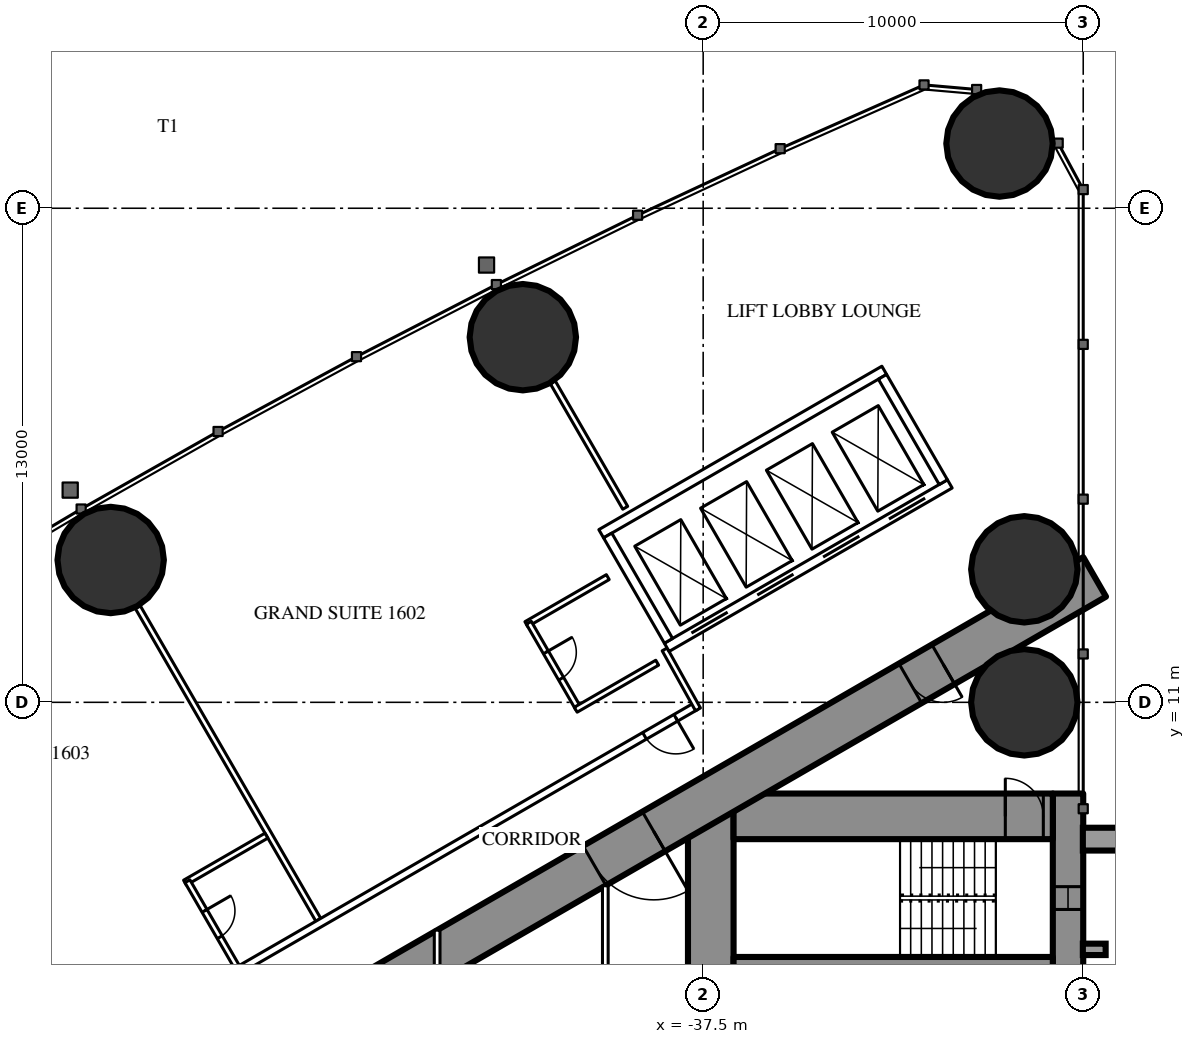
"""IFC4 building model, lengths in metres.
Left out: names, types, materials, properties, quantities, classifications, styles, units other than length and angle.
Written with IfcOpenShell. Run it as: python <this file> out.ifc"""

import sys

from ifc_helpers import new_model, si_unit, direction, frame, frame_2d, origin, origin_2d, place, context, subcontext, project, spatial, rectangle, hollow_circle, extrude, element, fill, save


model = new_model("IFC4")
c1 = context("Model", 3, precision=1e-05, world=origin(), true_north=direction((0.0, 1.0)))
c2 = subcontext(c1, "Body", "Model", "MODEL_VIEW")
j1 = project(units=[si_unit("LENGTHUNIT", "METRE"), si_unit("PLANEANGLEUNIT", "RADIAN")], contexts=[c1])
p1 = place(None, origin())
s1 = spatial("IfcSite", under=j1, at=p1, CompositionType="ELEMENT")
p2 = place(p1, origin())
s2 = spatial("IfcBuilding", under=s1, at=p2, CompositionType="ELEMENT")
p3 = place(p2, frame((0.0, 0.0, 63.5)))
s3 = spatial("IfcBuildingStorey", under=s2, at=p3, CompositionType="ELEMENT", Elevation=63.5)
for number, where, z_axis, x_axis in (
    (1, (-29.703, 25.703, 0.0), (0.0, 0.0, 1.0), (1.0, 0.0, 0.0)),
    (2, (-29.05, 11.0, 0.0), (0.0, 0.0, 1.0), (1.0, 0.0, 0.0)),
    (3, (-29.05, 14.5, 0.0), (0.0, 0.0, 1.0), (1.0, 0.0, 0.0)),
    (4, (-42.245, 20.607, 0.0), (0.0, 0.0, 1.0), (1.0, 0.0, 0.0)),
    (5, (-53.09, 14.745, 0.0), (0.0, 0.0, 1.0), (1.0, 0.0, 0.0)),
):
    element("IfcColumn", number, at=place(p3, frame(where, z_axis=z_axis, x_axis=x_axis)), inside=s3, PredefinedType="COLUMN", context=c2, shape_type="SweptSolid", body=[
        extrude(hollow_circle(Radius=1.4, WallThickness=0.12, at=origin_2d()), origin(), (0.0, 0.0, 1.0), 3.5),
    ])
p4 = place(p3, frame((-27.9, 8.6, 0.0), z_axis=(0.0, 0.0, 1.0), x_axis=(0.0, -1.0, 0.0)))
e6 = element("IfcWall", 6, at=p4, inside=s3, PredefinedType="SHEAR", context=c2, shape_type="SweptSolid", body=[
    extrude(rectangle(XDim=17.2, YDim=0.8, at=frame_2d((8.6, 0.0))), origin(), (0.0, 0.0, 1.0), 3.5),
])
p5 = place(p4, frame((2.45, 0.0, 0.6)))
e7 = element("IfcOpeningElement", 7, at=p5, cuts=e6, PredefinedType="OPENING", context=c2, shape_type="SweptSolid", body=[
    extrude(rectangle(XDim=0.6, YDim=2.1, at=frame_2d((0.3, 1.05))), frame((0.0, 0.41, 0.0), z_axis=(0.0, -1.0, 0.0), x_axis=(1.0, 0.0, 0.0)), (0.0, 0.0, 1.0), 0.82),
])
p6 = place(p4, frame((14.15, 0.0, 0.6)))
e8 = element("IfcOpeningElement", 8, at=p6, cuts=e6, PredefinedType="OPENING", context=c2, shape_type="SweptSolid", body=[
    extrude(rectangle(XDim=0.6, YDim=2.1, at=frame_2d((0.3, 1.05))), frame((0.0, 0.41, 0.0), z_axis=(0.0, -1.0, 0.0), x_axis=(1.0, 0.0, 0.0)), (0.0, 0.0, 1.0), 0.82),
])
p7 = place(p3, frame((-37.3, 8.6, 0.0), z_axis=(0.0, 0.0, 1.0), x_axis=(0.0, -1.0, 0.0)))
e9 = element("IfcWall", 9, at=p7, inside=s3, PredefinedType="SHEAR", context=c2, shape_type="SweptSolid", body=[
    extrude(rectangle(XDim=17.2, YDim=1.2, at=frame_2d((8.6, 0.0))), origin(), (0.0, 0.0, 1.0), 3.5),
])
p8 = place(p7, frame((7.7, 0.0, 0.0)))
e10 = element("IfcOpeningElement", 10, at=p8, cuts=e9, PredefinedType="OPENING", context=c2, shape_type="SweptSolid", body=[
    extrude(rectangle(XDim=1.8, YDim=2.2, at=frame_2d((0.9, 1.1))), frame((0.0, 0.61, 0.0), z_axis=(0.0, -1.0, 0.0), x_axis=(1.0, 0.0, 0.0)), (0.0, 0.0, 1.0), 1.22),
])
p9 = place(p3, frame((-28.3, 8.0, 0.0), z_axis=(0.0, 0.0, 1.0), x_axis=(-1.0, 0.0, 0.0)))
e11 = element("IfcWall", 11, at=p9, inside=s3, PredefinedType="SHEAR", context=c2, shape_type="SweptSolid", body=[
    extrude(rectangle(XDim=8.4, YDim=1.2, at=frame_2d((4.2, 0.0))), origin(), (0.0, 0.0, 1.0), 3.5),
])
p10 = place(p9, frame((0.25, 0.0, 0.0)))
e12 = element("IfcOpeningElement", 12, at=p10, cuts=e11, PredefinedType="OPENING", context=c2, shape_type="SweptSolid", body=[
    extrude(rectangle(XDim=1.0, YDim=2.2, at=frame_2d((0.5, 1.1))), frame((0.0, 0.61, 0.0), z_axis=(0.0, -1.0, 0.0), x_axis=(1.0, 0.0, 0.0)), (0.0, 0.0, 1.0), 1.22),
])
p11 = place(p3, frame((-28.3, 4.15, 0.0), z_axis=(0.0, 0.0, 1.0), x_axis=(-1.0, 0.0, 0.0)))
e13 = element("IfcWall", 13, at=p11, inside=s3, PredefinedType="SHEAR", context=c2, shape_type="SweptSolid", body=[
    extrude(rectangle(XDim=8.4, YDim=0.3, at=frame_2d((4.2, 0.0))), origin(), (0.0, 0.0, 1.0), 3.5),
])
p12 = place(p3, frame((-27.2, 14.3, 0.0), z_axis=(0.0, 0.0, 1.0), x_axis=(-0.866026593062, -0.499997940104, 0.0)))
e14 = element("IfcWall", 14, at=p12, inside=s3, PredefinedType="SHEAR", context=c2, shape_type="SweptSolid", body=[
    extrude(rectangle(XDim=28.946, YDim=1.2, at=frame_2d((14.473, 0.0))), origin(), (0.0, 0.0, 1.0), 3.5),
])
p13 = place(p12, frame((4.6, 0.0, 0.0)))
e15 = element("IfcOpeningElement", 15, at=p13, cuts=e14, PredefinedType="OPENING", context=c2, shape_type="SweptSolid", body=[
    extrude(rectangle(XDim=1.0, YDim=2.2, at=frame_2d((0.5, 1.1))), frame((0.0, 0.61, 0.0), z_axis=(0.0, -1.0, 0.0), x_axis=(1.0, 0.0, 0.0)), (0.0, 0.0, 1.0), 1.22),
])
p14 = place(p12, frame((13.395, 0.0, 0.0)))
e16 = element("IfcOpeningElement", 16, at=p14, cuts=e14, PredefinedType="OPENING", context=c2, shape_type="SweptSolid", body=[
    extrude(rectangle(XDim=1.8, YDim=2.2, at=frame_2d((0.9, 1.1))), frame((0.0, 0.61, 0.0), z_axis=(0.0, -1.0, 0.0), x_axis=(1.0, 0.0, 0.0)), (0.0, 0.0, 1.0), 1.22),
])
p15 = place(p3, frame((-47.627, 5.278, 0.0), z_axis=(0.0, 0.0, 1.0), x_axis=(-0.500009844318, 0.86601972009, 0.0)))
e17 = element("IfcWall", 17, at=p15, inside=s3, PredefinedType="PARTITIONING", context=c2, shape_type="SweptSolid", body=[
    extrude(rectangle(XDim=9.51, YDim=0.15, at=frame_2d((4.755, 0.0))), origin(), (0.0, 0.0, 1.0), 2.25),
])
p16 = place(p3, frame((-39.551, 16.119, 0.0), z_axis=(0.0, 0.0, 1.0), x_axis=(-0.500014214979, 0.866017196607, 0.0)))
e18 = element("IfcWall", 18, at=p16, inside=s3, PredefinedType="PARTITIONING", context=c2, shape_type="SweptSolid", body=[
    extrude(rectangle(XDim=3.815, YDim=0.15, at=frame_2d((1.907, 0.0))), origin(), (0.0, 0.0, 1.0), 3.25),
])
p17 = place(p3, frame((-37.7, 10.894, 0.0), z_axis=(0.0, 0.0, 1.0), x_axis=(-0.866027905338, -0.499995667157, 0.0)))
e19 = element("IfcWall", 19, at=p17, inside=s3, PredefinedType="PARTITIONING", context=c2, shape_type="SweptSolid", body=[
    extrude(rectangle(XDim=21.787, YDim=0.2, at=frame_2d((10.894, 0.0))), origin(), (0.0, 0.0, 1.0), 3.25),
])
p18 = place(p17, frame((14.13, 0.0, 0.0)))
e20 = element("IfcOpeningElement", 20, at=p18, cuts=e19, PredefinedType="OPENING", context=c2, shape_type="SweptSolid", body=[
    extrude(rectangle(XDim=0.95, YDim=2.2, at=frame_2d((0.475, 1.1))), frame((0.0, 0.11, 0.0), z_axis=(0.0, -1.0, 0.0), x_axis=(1.0, 0.0, 0.0)), (0.0, 0.0, 1.0), 0.22),
])
p19 = place(p17, frame((20.058, 0.0, 0.0)))
e21 = element("IfcOpeningElement", 21, at=p19, cuts=e19, PredefinedType="OPENING", context=c2, shape_type="SweptSolid", body=[
    extrude(rectangle(XDim=0.95, YDim=2.2, at=frame_2d((0.475, 1.1))), frame((0.0, 0.11, 0.0), z_axis=(0.0, -1.0, 0.0), x_axis=(1.0, 0.0, 0.0)), (0.0, 0.0, 1.0), 0.22),
])
p20 = place(p17, frame((0.6, 0.0, 0.0)))
e22 = element("IfcOpeningElement", 22, at=p20, cuts=e19, PredefinedType="OPENING", context=c2, shape_type="SweptSolid", body=[
    extrude(rectangle(XDim=0.95, YDim=2.2, at=frame_2d((0.475, 1.1))), frame((0.0, 0.11, 0.0), z_axis=(0.0, -1.0, 0.0), x_axis=(1.0, 0.0, 0.0)), (0.0, 0.0, 1.0), 0.22),
])
p21 = place(p3, frame((-38.513, 12.392, 0.0), z_axis=(0.0, 0.0, 1.0), x_axis=(0.485585508183, -0.874189175317, 0.0)))
e23 = element("IfcWall", 23, at=p21, inside=s3, PredefinedType="PARTITIONING", context=c2, shape_type="SweptSolid", body=[
    extrude(rectangle(XDim=1.805, YDim=0.15, at=frame_2d((0.902, 0.0))), origin(), (0.0, 0.0, 1.0), 3.25),
])
p22 = place(p3, frame((-48.992, 7.492, 0.0), z_axis=(0.0, 0.0, 1.0), x_axis=(-0.866031185235, -0.4999899861, 0.0)))
e24 = element("IfcWall", 24, at=p22, inside=s3, PredefinedType="PARTITIONING", context=c2, shape_type="SweptSolid", body=[
    extrude(rectangle(XDim=2.475, YDim=0.15, at=frame_2d((1.238, 0.0))), origin(), (0.0, 0.0, 1.0), 3.25),
])
p23 = place(p3, frame((-49.77, 4.04, 0.0), z_axis=(0.0, 0.0, 1.0), x_axis=(-0.500006934395, 0.866021400173, 0.0)))
e25 = element("IfcWall", 25, at=p23, inside=s3, PredefinedType="PARTITIONING", context=c2, shape_type="SweptSolid", body=[
    extrude(rectangle(XDim=2.6, YDim=0.15, at=frame_2d((1.3, 0.0))), origin(), (0.0, 0.0, 1.0), 3.25),
])
p24 = place(p23, frame((0.9, 0.0, 0.0)))
e26 = element("IfcOpeningElement", 26, at=p24, cuts=e25, PredefinedType="OPENING", context=c2, shape_type="SweptSolid", body=[
    extrude(rectangle(XDim=0.8, YDim=2.2, at=frame_2d((0.4, 1.1))), frame((0.0, 0.085, 0.0), z_axis=(0.0, -1.0, 0.0), x_axis=(1.0, 0.0, 0.0)), (0.0, 0.0, 1.0), 0.17),
])
p25 = place(p3, frame((-40.01, 14.294, 0.0), z_axis=(0.0, 0.0, 1.0), x_axis=(-0.866031185235, -0.4999899861, 0.0)))
e27 = element("IfcWall", 27, at=p25, inside=s3, PredefinedType="PARTITIONING", context=c2, shape_type="SweptSolid", body=[
    extrude(rectangle(XDim=2.475, YDim=0.15, at=frame_2d((1.238, 0.0))), origin(), (0.0, 0.0, 1.0), 3.25),
])
p26 = place(p3, frame((-40.788, 10.843, 0.0), z_axis=(0.0, 0.0, 1.0), x_axis=(-0.500006934395, 0.866021400173, 0.0)))
e28 = element("IfcWall", 28, at=p26, inside=s3, PredefinedType="PARTITIONING", context=c2, shape_type="SweptSolid", body=[
    extrude(rectangle(XDim=2.6, YDim=0.15, at=frame_2d((1.3, 0.0))), origin(), (0.0, 0.0, 1.0), 3.25),
])
p27 = place(p26, frame((0.9, 0.0, 0.0)))
e29 = element("IfcOpeningElement", 29, at=p27, cuts=e28, PredefinedType="OPENING", context=c2, shape_type="SweptSolid", body=[
    extrude(rectangle(XDim=0.8, YDim=2.2, at=frame_2d((0.4, 1.1))), frame((0.0, 0.085, 0.0), z_axis=(0.0, -1.0, 0.0), x_axis=(1.0, 0.0, 0.0)), (0.0, 0.0, 1.0), 0.17),
])
p28 = place(p3, frame((-38.71, 12.042, 0.0), z_axis=(0.0, 0.0, 1.0), x_axis=(-0.86604923931, -0.499958713387, 0.0)))
e30 = element("IfcWall", 30, at=p28, inside=s3, PredefinedType="PARTITIONING", context=c2, shape_type="SweptSolid", body=[
    extrude(rectangle(XDim=2.475, YDim=0.15, at=frame_2d((1.237, 0.0))), origin(), (0.0, 0.0, 1.0), 3.25),
])
p29 = place(p3, frame((-40.075, 6.174, 0.0), z_axis=(0.0, 0.0, 1.0), x_axis=(0.0, -1.0, 0.0)))
e31 = element("IfcWall", 31, at=p29, inside=s3, PredefinedType="PARTITIONING", context=c2, shape_type="SweptSolid", body=[
    extrude(rectangle(XDim=7.374, YDim=0.15, at=frame_2d((3.687, 0.0))), origin(), (0.0, 0.0, 1.0), 3.25),
])
p30 = place(p29, frame((2.787, 0.0, 0.0)))
e32 = element("IfcOpeningElement", 32, at=p30, cuts=e31, PredefinedType="OPENING", context=c2, shape_type="SweptSolid", body=[
    extrude(rectangle(XDim=1.8, YDim=2.2, at=frame_2d((0.9, 1.1))), frame((0.0, 0.085, 0.0), z_axis=(0.0, -1.0, 0.0), x_axis=(1.0, 0.0, 0.0)), (0.0, 0.0, 1.0), 0.17),
])
p31 = place(p3, frame((-44.5, 5.005, 0.0), z_axis=(0.0, 0.0, 1.0), x_axis=(0.0, -1.0, 0.0)))
e33 = element("IfcWall", 33, at=p31, inside=s3, PredefinedType="PARTITIONING", context=c2, shape_type="SweptSolid", body=[
    extrude(rectangle(XDim=10.009, YDim=0.15, at=frame_2d((5.005, 0.0))), origin(), (0.0, 0.0, 1.0), 2.45),
])
p32 = place(p31, frame((2.002, 0.0, 0.0)))
e34 = element("IfcOpeningElement", 34, at=p32, cuts=e33, PredefinedType="OPENING", context=c2, shape_type="SweptSolid", body=[
    extrude(rectangle(XDim=1.0, YDim=2.2, at=frame_2d((0.5, 1.1))), frame((0.0, 0.085, 0.0), z_axis=(0.0, -1.0, 0.0), x_axis=(1.0, 0.0, 0.0)), (0.0, 0.0, 1.0), 0.17),
])
p33 = place(p31, frame((7.007, 0.0, 0.0)))
e35 = element("IfcOpeningElement", 35, at=p33, cuts=e33, PredefinedType="OPENING", context=c2, shape_type="SweptSolid", body=[
    extrude(rectangle(XDim=1.0, YDim=2.2, at=frame_2d((0.5, 1.1))), frame((0.0, 0.085, 0.0), z_axis=(0.0, -1.0, 0.0), x_axis=(1.0, 0.0, 0.0)), (0.0, 0.0, 1.0), 0.17),
])
p34 = place(p3, frame((-31.01, 16.747, 0.0), z_axis=(0.0, 0.0, 1.0), x_axis=(-0.866028165386, -0.499995216735, 0.0)))
e36 = element("IfcWall", 36, at=p34, inside=s3, PredefinedType="PARTITIONING", context=c2, shape_type="SweptSolid", body=[
    extrude(rectangle(XDim=8.6, YDim=0.25, at=frame_2d((4.3, 0.0))), origin(), (0.0, 0.0, 1.0), 3.25),
])
p35 = place(p34, frame((0.75, 0.0, 0.0)))
e37 = element("IfcOpeningElement", 37, at=p35, cuts=e36, PredefinedType="OPENING", context=c2, shape_type="SweptSolid", body=[
    extrude(rectangle(XDim=1.1, YDim=2.2, at=frame_2d((0.55, 1.1))), frame((0.0, 0.135, 0.0), z_axis=(0.0, -1.0, 0.0), x_axis=(1.0, 0.0, 0.0)), (0.0, 0.0, 1.0), 0.27),
])
p36 = place(p34, frame((2.75, 0.0, 0.0)))
e38 = element("IfcOpeningElement", 38, at=p36, cuts=e36, PredefinedType="OPENING", context=c2, shape_type="SweptSolid", body=[
    extrude(rectangle(XDim=1.1, YDim=2.2, at=frame_2d((0.55, 1.1))), frame((0.0, 0.135, 0.0), z_axis=(0.0, -1.0, 0.0), x_axis=(1.0, 0.0, 0.0)), (0.0, 0.0, 1.0), 0.27),
])
p37 = place(p34, frame((4.75, 0.0, 0.0)))
e39 = element("IfcOpeningElement", 39, at=p37, cuts=e36, PredefinedType="OPENING", context=c2, shape_type="SweptSolid", body=[
    extrude(rectangle(XDim=1.1, YDim=2.2, at=frame_2d((0.55, 1.1))), frame((0.0, 0.135, 0.0), z_axis=(0.0, -1.0, 0.0), x_axis=(1.0, 0.0, 0.0)), (0.0, 0.0, 1.0), 0.27),
])
p38 = place(p34, frame((6.75, 0.0, 0.0)))
e40 = element("IfcOpeningElement", 40, at=p38, cuts=e36, PredefinedType="OPENING", context=c2, shape_type="SweptSolid", body=[
    extrude(rectangle(XDim=1.1, YDim=2.2, at=frame_2d((0.55, 1.1))), frame((0.0, 0.135, 0.0), z_axis=(0.0, -1.0, 0.0), x_axis=(1.0, 0.0, 0.0)), (0.0, 0.0, 1.0), 0.27),
])
p39 = place(p3, frame((-32.736, 19.736, 0.0), z_axis=(0.0, 0.0, 1.0), x_axis=(-0.866028165386, -0.499995216735, 0.0)))
e41 = element("IfcWall", 41, at=p39, inside=s3, PredefinedType="PARTITIONING", context=c2, shape_type="SweptSolid", body=[
    extrude(rectangle(XDim=8.6, YDim=0.25, at=frame_2d((4.3, 0.0))), origin(), (0.0, 0.0, 1.0), 3.25),
])
p40 = place(p3, frame((-31.181, 16.793, 0.0), z_axis=(0.0, 0.0, 1.0), x_axis=(-0.499929347863, 0.866066190972, 0.0)))
e42 = element("IfcWall", 42, at=p40, inside=s3, PredefinedType="PARTITIONING", context=c2, shape_type="SweptSolid", body=[
    extrude(rectangle(XDim=3.201, YDim=0.25, at=frame_2d((1.6, 0.0))), origin(), (0.0, 0.0, 1.0), 3.25),
])
p41 = place(p3, frame((-38.413, 12.618, 0.0), z_axis=(0.0, 0.0, 1.0), x_axis=(-0.499872130319, 0.866099216793, 0.0)))
e43 = element("IfcWall", 43, at=p41, inside=s3, PredefinedType="PARTITIONING", context=c2, shape_type="SweptSolid", body=[
    extrude(rectangle(XDim=3.2, YDim=0.25, at=frame_2d((1.6, 0.0))), origin(), (0.0, 0.0, 1.0), 3.25),
])
p42 = place(p24, origin())
e44 = element("IfcDoor", 44, at=p42, inside=s3, OperationType="SINGLE_SWING_RIGHT", PredefinedType="DOOR", context=c2, shape_type="SweptSolid", body=[
    extrude(rectangle(XDim=0.8, YDim=2.2, at=frame_2d((0.4, 1.1))), frame((0.0, 0.025, 0.0), z_axis=(0.0, -1.0, 0.0), x_axis=(1.0, 0.0, 0.0)), (0.0, 0.0, 1.0), 0.05),
])
fill(e26, e44)
p43 = place(p27, origin())
e45 = element("IfcDoor", 45, at=p43, inside=s3, OperationType="SINGLE_SWING_RIGHT", PredefinedType="DOOR", context=c2, shape_type="SweptSolid", body=[
    extrude(rectangle(XDim=0.8, YDim=2.2, at=frame_2d((0.4, 1.1))), frame((0.0, 0.025, 0.0), z_axis=(0.0, -1.0, 0.0), x_axis=(1.0, 0.0, 0.0)), (0.0, 0.0, 1.0), 0.05),
])
fill(e29, e45)
p44 = place(p20, origin())
e46 = element("IfcDoor", 46, at=p44, inside=s3, OperationType="SINGLE_SWING_LEFT", PredefinedType="DOOR", context=c2, shape_type="SweptSolid", body=[
    extrude(rectangle(XDim=0.95, YDim=2.2, at=frame_2d((0.475, 1.1))), frame((0.0, 0.025, 0.0), z_axis=(0.0, -1.0, 0.0), x_axis=(1.0, 0.0, 0.0)), (0.0, 0.0, 1.0), 0.05),
])
fill(e22, e46)
p45 = place(p13, origin())
e47 = element("IfcDoor", 47, at=p45, inside=s3, OperationType="SINGLE_SWING_LEFT", PredefinedType="DOOR", context=c2, shape_type="SweptSolid", body=[
    extrude(rectangle(XDim=1.0, YDim=2.2, at=frame_2d((0.5, 1.1))), frame((0.0, 0.025, 0.0), z_axis=(0.0, -1.0, 0.0), x_axis=(1.0, 0.0, 0.0)), (0.0, 0.0, 1.0), 0.05),
])
fill(e15, e47)
p46 = place(p14, origin())
e48 = element("IfcDoor", 48, at=p46, inside=s3, OperationType="DOUBLE_DOOR_SINGLE_SWING", PredefinedType="DOOR", context=c2, shape_type="SweptSolid", body=[
    extrude(rectangle(XDim=1.8, YDim=2.2, at=frame_2d((0.9, 1.1))), frame((0.0, 0.025, 0.0), z_axis=(0.0, -1.0, 0.0), x_axis=(1.0, 0.0, 0.0)), (0.0, 0.0, 1.0), 0.05),
])
fill(e16, e48)
p47 = place(p10, origin())
e49 = element("IfcDoor", 49, at=p47, inside=s3, OperationType="SINGLE_SWING_RIGHT", PredefinedType="DOOR", context=c2, shape_type="SweptSolid", body=[
    extrude(rectangle(XDim=1.0, YDim=2.2, at=frame_2d((0.5, 1.1))), frame((0.0, 0.025, 0.0), z_axis=(0.0, -1.0, 0.0), x_axis=(1.0, 0.0, 0.0)), (0.0, 0.0, 1.0), 0.05),
])
fill(e12, e49)
p48 = place(p35, origin())
e50 = element("IfcDoor", 50, at=p48, inside=s3, OperationType="DOUBLE_DOOR_SLIDING", PredefinedType="USERDEFINED", context=c2, shape_type="SweptSolid", body=[
    extrude(rectangle(XDim=1.1, YDim=2.2, at=frame_2d((0.55, 1.1))), frame((0.0, 0.025, 0.0), z_axis=(0.0, -1.0, 0.0), x_axis=(1.0, 0.0, 0.0)), (0.0, 0.0, 1.0), 0.05),
])
fill(e37, e50)
p49 = place(p36, origin())
e51 = element("IfcDoor", 51, at=p49, inside=s3, OperationType="DOUBLE_DOOR_SLIDING", PredefinedType="USERDEFINED", context=c2, shape_type="SweptSolid", body=[
    extrude(rectangle(XDim=1.1, YDim=2.2, at=frame_2d((0.55, 1.1))), frame((0.0, 0.025, 0.0), z_axis=(0.0, -1.0, 0.0), x_axis=(1.0, 0.0, 0.0)), (0.0, 0.0, 1.0), 0.05),
])
fill(e38, e51)
p50 = place(p37, origin())
e52 = element("IfcDoor", 52, at=p50, inside=s3, OperationType="DOUBLE_DOOR_SLIDING", PredefinedType="USERDEFINED", context=c2, shape_type="SweptSolid", body=[
    extrude(rectangle(XDim=1.1, YDim=2.2, at=frame_2d((0.55, 1.1))), frame((0.0, 0.025, 0.0), z_axis=(0.0, -1.0, 0.0), x_axis=(1.0, 0.0, 0.0)), (0.0, 0.0, 1.0), 0.05),
])
fill(e39, e52)
p51 = place(p38, origin())
e53 = element("IfcDoor", 53, at=p51, inside=s3, OperationType="DOUBLE_DOOR_SLIDING", PredefinedType="USERDEFINED", context=c2, shape_type="SweptSolid", body=[
    extrude(rectangle(XDim=1.1, YDim=2.2, at=frame_2d((0.55, 1.1))), frame((0.0, 0.025, 0.0), z_axis=(0.0, -1.0, 0.0), x_axis=(1.0, 0.0, 0.0)), (0.0, 0.0, 1.0), 0.05),
])
fill(e40, e53)
p52 = place(p5, origin())
e54 = element("IfcWindow", 54, at=p52, inside=s3, PartitioningType="SINGLE_PANEL", PredefinedType="WINDOW", context=c2, shape_type="SweptSolid", body=[
    extrude(rectangle(XDim=0.6, YDim=2.1, at=frame_2d((0.3, 1.05))), frame((0.0, 0.03, 0.0), z_axis=(0.0, -1.0, 0.0), x_axis=(1.0, 0.0, 0.0)), (0.0, 0.0, 1.0), 0.06),
])
fill(e7, e54)
save(model, sys.argv[1])
